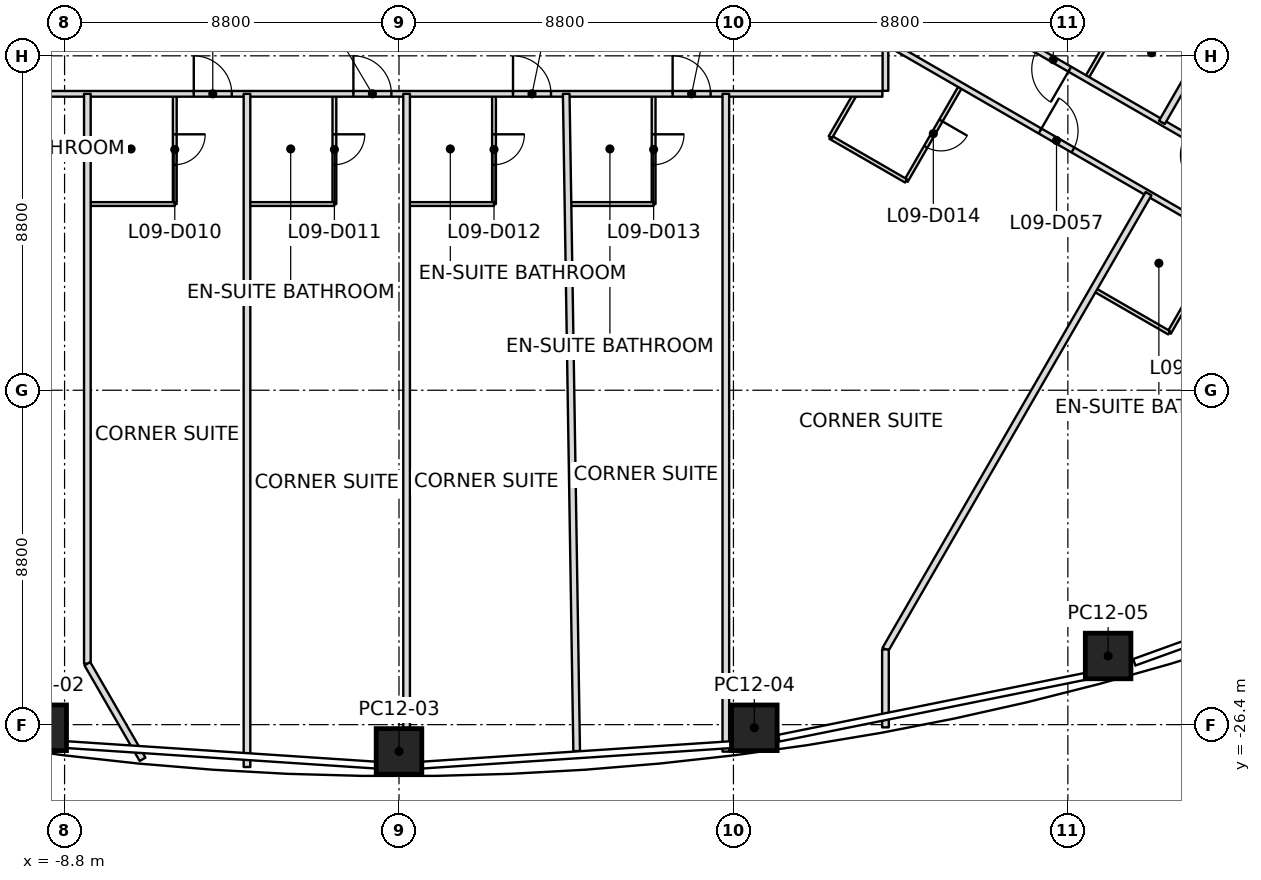
"""IFC4 building model, lengths in metres.
Left out: names, types, materials, properties, quantities, classifications, styles, units other than length and angle.
Written with IfcOpenShell. Run it as: python <this file> out.ifc"""

import sys

from ifc_helpers import new_model, si_unit, direction, frame, frame_2d, origin, origin_2d, place, context, subcontext, project, spatial, rectangle, extrude, clip, halfspace, element, fill, save


model = new_model("IFC4")
c1 = context("Model", 3, precision=1e-05, world=origin(), true_north=direction((0.0, 1.0)))
c2 = subcontext(c1, "Body", "Model", "MODEL_VIEW")
j1 = project(units=[si_unit("LENGTHUNIT", "METRE"), si_unit("PLANEANGLEUNIT", "RADIAN")], contexts=[c1])
p1 = place(None, origin())
s1 = spatial("IfcSite", under=j1, at=p1, CompositionType="ELEMENT")
p2 = place(p1, origin())
s2 = spatial("IfcBuilding", under=s1, at=p2, CompositionType="ELEMENT")
p3 = place(p2, frame((0.0, 0.0, 55.4)))
s3 = spatial("IfcBuildingStorey", under=s2, at=p3, CompositionType="ELEMENT", Elevation=55.4)
p4 = place(p3, frame((-9.35, -26.482, 0.0), z_axis=(0.00938855127, 0.223717601847, 0.974608788042), x_axis=(0.984896435556, -0.170583568587, 0.029669131402)))
e1 = element("IfcColumn", 1, at=p4, inside=s3, PredefinedType="COLUMN", context=c2, shape_type="SweptSolid", body=[
    extrude(rectangle(XDim=1.2, YDim=1.2, at=origin_2d()), origin(), (0.0, 0.0, 1.0), 3.797),
])
p5 = place(p3, frame((0.0, -27.104, 0.0), z_axis=(0.0, 0.238674212769, 0.971099696303), x_axis=(-1.0, 0.0, 0.0)))
e2 = element("IfcColumn", 2, at=p5, inside=s3, PredefinedType="COLUMN", context=c2, shape_type="SweptSolid", body=[
    extrude(rectangle(XDim=1.2, YDim=1.2, at=origin_2d()), origin(), (0.0, 0.0, 1.0), 3.81),
])
p6 = place(p3, frame((9.35, -26.482, 0.0), z_axis=(-0.00938855127, 0.223717601847, 0.974608788042), x_axis=(-0.984896435556, -0.170583568587, 0.029669131402)))
e3 = element("IfcColumn", 3, at=p6, inside=s3, PredefinedType="COLUMN", context=c2, shape_type="SweptSolid", body=[
    extrude(rectangle(XDim=1.2, YDim=1.2, at=origin_2d()), origin(), (0.0, 0.0, 1.0), 3.797),
])
p7 = place(p3, frame((18.659, -24.593, 0.0), z_axis=(-0.018962740175, 0.175794991964, 0.984244144146), x_axis=(0.964231408406, 0.26352619053, -0.028491015209)))
e4 = element("IfcColumn", 4, at=p7, inside=s3, PredefinedType="COLUMN", context=c2, shape_type="SweptSolid", body=[
    clip(clip(extrude(rectangle(XDim=1.2, YDim=1.2, at=origin_2d()), origin(), (0.0, 0.0, 1.0), 3.76), halfspace(frame((0.0, 0.0, 0.001)), True)), halfspace(frame((0.0, 0.0, 3.759)), False)),
])
p8 = place(p3, frame((-8.2, -9.8, 0.0), z_axis=(0.0, 0.0, 1.0), x_axis=(0.0, -1.0, 0.0)))
e5 = element("IfcWall", 5, at=p8, inside=s3, PredefinedType="PARTITIONING", context=c2, shape_type="SweptSolid", body=[
    extrude(rectangle(XDim=14.997, YDim=0.175, at=frame_2d((7.498, 0.0))), origin(), (0.0, 0.0, 1.0), 3.0),
])
p9 = place(p3, frame((-8.2, -24.797, 0.0), z_axis=(0.0, 0.0, 1.0), x_axis=(0.499998917442, -0.866026028799, 0.0)))
e6 = element("IfcWall", 6, at=p9, inside=s3, PredefinedType="PARTITIONING", context=c2, shape_type="SweptSolid", body=[
    extrude(rectangle(XDim=2.905, YDim=0.175, at=frame_2d((1.452, 0.0))), origin(), (0.0, 0.0, 1.0), 2.784),
])
p10 = place(p3, frame((-4.0, -9.8, 0.0), z_axis=(0.0, 0.0, 1.0), x_axis=(0.0, -1.0, 0.0)))
e7 = element("IfcWall", 7, at=p10, inside=s3, PredefinedType="PARTITIONING", context=c2, shape_type="SweptSolid", body=[
    extrude(rectangle(XDim=17.715, YDim=0.175, at=frame_2d((8.857, 0.0))), origin(), (0.0, 0.0, 1.0), 2.784),
])
p11 = place(p3, frame((0.2, -9.8, 0.0), z_axis=(0.0, 0.0, 1.0), x_axis=(0.0, -1.0, 0.0)))
e8 = element("IfcWall", 8, at=p11, inside=s3, PredefinedType="PARTITIONING", context=c2, shape_type="SweptSolid", body=[
    extrude(rectangle(XDim=17.828, YDim=0.175, at=frame_2d((8.914, 0.0))), origin(), (0.0, 0.0, 1.0), 3.0),
])
p12 = place(p3, frame((4.4, -9.8, 0.0), z_axis=(0.0, 0.0, 1.0), x_axis=(0.015892742746, -0.999873702388, 0.0)))
e9 = element("IfcWall", 9, at=p12, inside=s3, PredefinedType="PARTITIONING", context=c2, shape_type="SweptSolid", body=[
    extrude(rectangle(XDim=17.297, YDim=0.175, at=frame_2d((8.649, 0.0))), origin(), (0.0, 0.0, 1.0), 2.934),
])
p13 = place(p3, frame((8.6, -9.8, 0.0), z_axis=(0.0, 0.0, 1.0), x_axis=(0.0, -1.0, 0.0)))
e10 = element("IfcWall", 10, at=p13, inside=s3, PredefinedType="PARTITIONING", context=c2, shape_type="SweptSolid", body=[
    extrude(rectangle(XDim=17.31, YDim=0.175, at=frame_2d((8.655, 0.0))), origin(), (0.0, 0.0, 1.0), 2.934),
])
p14 = place(p3, frame((19.724, -12.427, 0.0), z_axis=(0.0, 0.0, 1.0), x_axis=(-0.499994112739, -0.866028802769, 0.0)))
e11 = element("IfcWall", 11, at=p14, inside=s3, PredefinedType="PARTITIONING", context=c2, shape_type="SweptSolid", body=[
    extrude(rectangle(XDim=13.847, YDim=0.175, at=frame_2d((6.924, 0.0))), origin(), (0.0, 0.0, 1.0), 2.797),
])
p15 = place(p3, frame((12.8, -24.419, 0.0), z_axis=(0.0, 0.0, 1.0), x_axis=(0.0, -1.0, 0.0)))
e12 = element("IfcWall", 12, at=p15, inside=s3, PredefinedType="PARTITIONING", context=c2, shape_type="SweptSolid", body=[
    extrude(rectangle(XDim=2.052, YDim=0.175, at=frame_2d((1.026, 0.0))), origin(), (0.0, 0.0, 1.0), 2.934),
])
p16 = place(p3, frame((20.075, -10.551, 0.0), z_axis=(0.0, 0.0, 1.0), x_axis=(0.500001190589, 0.866024716396, 0.0)))
e13 = element("IfcWall", 13, at=p16, inside=s3, PredefinedType="PARTITIONING", context=c2, shape_type="SweptSolid", body=[
    extrude(rectangle(XDim=12.156, YDim=0.175, at=frame_2d((6.078, 0.0))), origin(), (0.0, 0.0, 1.0), 2.934),
])
p17 = place(p3, frame((-12.72, -9.8, 0.0), z_axis=(0.0, 0.0, 1.0), x_axis=(1.0, 0.0, 0.0)))
e14 = element("IfcWall", 14, at=p17, inside=s3, PredefinedType="PARTITIONING", context=c2, shape_type="SweptSolid", body=[
    extrude(rectangle(XDim=25.44, YDim=0.15, at=frame_2d((12.72, 0.0))), origin(), (0.0, 0.0, 1.0), 2.797),
])
p18 = place(p17, frame((7.32, 0.0, 0.0)))
e15 = element("IfcOpeningElement", 15, at=p18, cuts=e14, PredefinedType="OPENING", context=c2, shape_type="SweptSolid", body=[
    extrude(rectangle(XDim=1.0, YDim=2.1, at=frame_2d((0.5, 1.05))), frame((0.0, 0.075, 0.0), z_axis=(0.0, -1.0, 0.0), x_axis=(1.0, 0.0, 0.0)), (0.0, 0.0, 1.0), 0.15),
])
p19 = place(p17, frame((11.52, 0.0, 0.0)))
e16 = element("IfcOpeningElement", 16, at=p19, cuts=e14, PredefinedType="OPENING", context=c2, shape_type="SweptSolid", body=[
    extrude(rectangle(XDim=1.0, YDim=2.1, at=frame_2d((0.5, 1.05))), frame((0.0, 0.075, 0.0), z_axis=(0.0, -1.0, 0.0), x_axis=(1.0, 0.0, 0.0)), (0.0, 0.0, 1.0), 0.15),
])
p20 = place(p17, frame((15.72, 0.0, 0.0)))
e17 = element("IfcOpeningElement", 17, at=p20, cuts=e14, PredefinedType="OPENING", context=c2, shape_type="SweptSolid", body=[
    extrude(rectangle(XDim=1.0, YDim=2.1, at=frame_2d((0.5, 1.05))), frame((0.0, 0.075, 0.0), z_axis=(0.0, -1.0, 0.0), x_axis=(1.0, 0.0, 0.0)), (0.0, 0.0, 1.0), 0.15),
])
p21 = place(p17, frame((19.92, 0.0, 0.0)))
e18 = element("IfcOpeningElement", 18, at=p21, cuts=e14, PredefinedType="OPENING", context=c2, shape_type="SweptSolid", body=[
    extrude(rectangle(XDim=1.0, YDim=2.1, at=frame_2d((0.5, 1.05))), frame((0.0, 0.075, 0.0), z_axis=(0.0, -1.0, 0.0), x_axis=(1.0, 0.0, 0.0)), (0.0, 0.0, 1.0), 0.15),
])
p22 = place(p3, frame((12.8, -9.72, 0.0), z_axis=(0.0, 0.0, 1.0), x_axis=(0.0, 1.0, 0.0)))
e19 = element("IfcWall", 19, at=p22, inside=s3, PredefinedType="PARTITIONING", context=c2, shape_type="SweptSolid", body=[
    extrude(rectangle(XDim=1.291, YDim=0.15, at=frame_2d((0.646, 0.0))), origin(), (0.0, 0.0, 1.0), 2.797),
])
p23 = place(p3, frame((12.879, -8.475, 0.0), z_axis=(0.0, 0.0, 1.0), x_axis=(0.866028715104, -0.499994264582, 0.0)))
e20 = element("IfcWall", 20, at=p23, inside=s3, PredefinedType="PARTITIONING", context=c2, shape_type="SweptSolid", body=[
    extrude(rectangle(XDim=12.103, YDim=0.15, at=frame_2d((6.052, 0.0))), origin(), (0.0, 0.0, 1.0), 2.797),
])
p24 = place(p23, frame((4.606, 0.0, 0.0)))
e21 = element("IfcOpeningElement", 21, at=p24, cuts=e20, PredefinedType="OPENING", context=c2, shape_type="SweptSolid", body=[
    extrude(rectangle(XDim=1.0, YDim=2.1, at=frame_2d((0.5, 1.05))), frame((0.0, 0.075, 0.0), z_axis=(0.0, -1.0, 0.0), x_axis=(1.0, 0.0, 0.0)), (0.0, 0.0, 1.0), 0.15),
])
p25 = place(p23, frame((10.703, 0.0, 0.0)))
e22 = element("IfcOpeningElement", 22, at=p25, cuts=e20, PredefinedType="OPENING", context=c2, shape_type="SweptSolid", body=[
    extrude(rectangle(XDim=1.0, YDim=2.1, at=frame_2d((0.5, 1.05))), frame((0.0, 0.075, 0.0), z_axis=(0.0, -1.0, 0.0), x_axis=(1.0, 0.0, 0.0)), (0.0, 0.0, 1.0), 0.15),
])
p26 = place(p3, frame((24.192, -12.928, 0.0), z_axis=(0.0, 0.0, 1.0), x_axis=(-0.866018681408, 0.500011643316, 0.0)))
e23 = element("IfcWall", 23, at=p26, inside=s3, PredefinedType="PARTITIONING", context=c2, shape_type="SweptSolid", body=[
    extrude(rectangle(XDim=13.154, YDim=0.15, at=frame_2d((6.577, 0.0))), origin(), (0.0, 0.0, 1.0), 2.947),
])
p27 = place(p26, frame((3.037, 0.0, 0.0)))
e24 = element("IfcOpeningElement", 24, at=p27, cuts=e23, PredefinedType="OPENING", context=c2, shape_type="SweptSolid", body=[
    extrude(rectangle(XDim=1.0, YDim=2.1, at=frame_2d((0.5, 1.05))), frame((0.0, 0.075, 0.0), z_axis=(0.0, -1.0, 0.0), x_axis=(1.0, 0.0, 0.0)), (0.0, 0.0, 1.0), 0.15),
])
p28 = place(p26, frame((7.554, 0.0, 0.0)))
e25 = element("IfcOpeningElement", 25, at=p28, cuts=e23, PredefinedType="OPENING", context=c2, shape_type="SweptSolid", body=[
    extrude(rectangle(XDim=1.0, YDim=2.1, at=frame_2d((0.5, 1.05))), frame((0.0, 0.075, 0.0), z_axis=(0.0, -1.0, 0.0), x_axis=(1.0, 0.0, 0.0)), (0.0, 0.0, 1.0), 0.15),
])
p29 = place(p3, frame((-5.9, -9.83, 0.0), z_axis=(0.0, 0.0, 1.0), x_axis=(0.0, -1.0, 0.0)))
e26 = element("IfcWall", 26, at=p29, inside=s3, PredefinedType="PARTITIONING", context=c2, shape_type="SweptSolid", body=[
    extrude(rectangle(XDim=2.87, YDim=0.1, at=frame_2d((1.435, 0.0))), origin(), (0.0, 0.0, 1.0), 3.0),
])
p30 = place(p29, frame((1.035, 0.0, 0.0)))
e27 = element("IfcOpeningElement", 27, at=p30, cuts=e26, PredefinedType="OPENING", context=c2, shape_type="SweptSolid", body=[
    extrude(rectangle(XDim=0.8, YDim=2.1, at=frame_2d((0.4, 1.05))), frame((0.0, 0.05, 0.0), z_axis=(0.0, -1.0, 0.0), x_axis=(1.0, 0.0, 0.0)), (0.0, 0.0, 1.0), 0.1),
])
p31 = place(p3, frame((-5.9, -12.7, 0.0), z_axis=(0.0, 0.0, 1.0), x_axis=(-1.0, 0.0, 0.0)))
e28 = element("IfcWall", 28, at=p31, inside=s3, PredefinedType="PARTITIONING", context=c2, shape_type="SweptSolid", body=[
    extrude(rectangle(XDim=2.27, YDim=0.1, at=frame_2d((1.135, 0.0))), origin(), (0.0, 0.0, 1.0), 2.797),
])
p32 = place(p3, frame((-1.7, -9.83, 0.0), z_axis=(0.0, 0.0, 1.0), x_axis=(0.0, -1.0, 0.0)))
e29 = element("IfcWall", 29, at=p32, inside=s3, PredefinedType="PARTITIONING", context=c2, shape_type="SweptSolid", body=[
    extrude(rectangle(XDim=2.87, YDim=0.1, at=frame_2d((1.435, 0.0))), origin(), (0.0, 0.0, 1.0), 3.0),
])
p33 = place(p32, frame((1.035, 0.0, 0.0)))
e30 = element("IfcOpeningElement", 30, at=p33, cuts=e29, PredefinedType="OPENING", context=c2, shape_type="SweptSolid", body=[
    extrude(rectangle(XDim=0.8, YDim=2.1, at=frame_2d((0.4, 1.05))), frame((0.0, 0.05, 0.0), z_axis=(0.0, -1.0, 0.0), x_axis=(1.0, 0.0, 0.0)), (0.0, 0.0, 1.0), 0.1),
])
p34 = place(p3, frame((-1.7, -12.7, 0.0), z_axis=(0.0, 0.0, 1.0), x_axis=(-1.0, 0.0, 0.0)))
e31 = element("IfcWall", 31, at=p34, inside=s3, PredefinedType="PARTITIONING", context=c2, shape_type="SweptSolid", body=[
    extrude(rectangle(XDim=2.27, YDim=0.1, at=frame_2d((1.135, 0.0))), origin(), (0.0, 0.0, 1.0), 2.947),
])
p35 = place(p3, frame((2.5, -9.83, 0.0), z_axis=(0.0, 0.0, 1.0), x_axis=(0.0, -1.0, 0.0)))
e32 = element("IfcWall", 32, at=p35, inside=s3, PredefinedType="PARTITIONING", context=c2, shape_type="SweptSolid", body=[
    extrude(rectangle(XDim=2.87, YDim=0.1, at=frame_2d((1.435, 0.0))), origin(), (0.0, 0.0, 1.0), 3.0),
])
p36 = place(p35, frame((1.035, 0.0, 0.0)))
e33 = element("IfcOpeningElement", 33, at=p36, cuts=e32, PredefinedType="OPENING", context=c2, shape_type="SweptSolid", body=[
    extrude(rectangle(XDim=0.8, YDim=2.1, at=frame_2d((0.4, 1.05))), frame((0.0, 0.05, 0.0), z_axis=(0.0, -1.0, 0.0), x_axis=(1.0, 0.0, 0.0)), (0.0, 0.0, 1.0), 0.1),
])
p37 = place(p3, frame((2.5, -12.7, 0.0), z_axis=(0.0, 0.0, 1.0), x_axis=(-1.0, 0.0, 0.0)))
e34 = element("IfcWall", 34, at=p37, inside=s3, PredefinedType="PARTITIONING", context=c2, shape_type="SweptSolid", body=[
    extrude(rectangle(XDim=2.27, YDim=0.1, at=frame_2d((1.135, 0.0))), origin(), (0.0, 0.0, 1.0), 3.0),
])
p38 = place(p3, frame((6.7, -9.83, 0.0), z_axis=(0.0, 0.0, 1.0), x_axis=(0.0, -1.0, 0.0)))
e35 = element("IfcWall", 35, at=p38, inside=s3, PredefinedType="PARTITIONING", context=c2, shape_type="SweptSolid", body=[
    extrude(rectangle(XDim=2.87, YDim=0.1, at=frame_2d((1.435, 0.0))), origin(), (0.0, 0.0, 1.0), 3.0),
])
p39 = place(p38, frame((1.035, 0.0, 0.0)))
e36 = element("IfcOpeningElement", 36, at=p39, cuts=e35, PredefinedType="OPENING", context=c2, shape_type="SweptSolid", body=[
    extrude(rectangle(XDim=0.8, YDim=2.1, at=frame_2d((0.4, 1.05))), frame((0.0, 0.05, 0.0), z_axis=(0.0, -1.0, 0.0), x_axis=(1.0, 0.0, 0.0)), (0.0, 0.0, 1.0), 0.1),
])
p40 = place(p3, frame((6.7, -12.7, 0.0), z_axis=(0.0, 0.0, 1.0), x_axis=(-1.0, 0.0, 0.0)))
e37 = element("IfcWall", 37, at=p40, inside=s3, PredefinedType="PARTITIONING", context=c2, shape_type="SweptSolid", body=[
    extrude(rectangle(XDim=2.27, YDim=0.1, at=frame_2d((1.135, 0.0))), origin(), (0.0, 0.0, 1.0), 2.947),
])
p41 = place(p3, frame((14.777, -9.605, 0.0), z_axis=(0.0, 0.0, 1.0), x_axis=(-0.499999802827, -0.866025517622, 0.0)))
e38 = element("IfcWall", 38, at=p41, inside=s3, PredefinedType="PARTITIONING", context=c2, shape_type="SweptSolid", body=[
    extrude(rectangle(XDim=2.87, YDim=0.1, at=frame_2d((1.435, 0.0))), origin(), (0.0, 0.0, 1.0), 2.797),
])
p42 = place(p41, frame((1.035, 0.0, 0.0)))
e39 = element("IfcOpeningElement", 39, at=p42, cuts=e38, PredefinedType="OPENING", context=c2, shape_type="SweptSolid", body=[
    extrude(rectangle(XDim=0.8, YDim=2.1, at=frame_2d((0.4, 1.05))), frame((0.0, 0.05, 0.0), z_axis=(0.0, -1.0, 0.0), x_axis=(1.0, 0.0, 0.0)), (0.0, 0.0, 1.0), 0.1),
])
p43 = place(p3, frame((13.342, -12.091, 0.0), z_axis=(0.0, 0.0, 1.0), x_axis=(-0.86602648383, 0.499998129301, 0.0)))
e40 = element("IfcWall", 40, at=p43, inside=s3, PredefinedType="PARTITIONING", context=c2, shape_type="SweptSolid", body=[
    extrude(rectangle(XDim=2.3, YDim=0.1, at=frame_2d((1.15, 0.0))), origin(), (0.0, 0.0, 1.0), 2.947),
])
p44 = place(p3, frame((11.35, -10.941, 0.0), z_axis=(0.0, 0.0, 1.0), x_axis=(0.499865263774, 0.866103179807, 0.0)))
e41 = element("IfcWall", 41, at=p44, inside=s3, PredefinedType="PARTITIONING", context=c2, shape_type="SweptSolid", body=[
    extrude(rectangle(XDim=1.282, YDim=0.1, at=frame_2d((0.641, 0.0))), origin(), (0.0, 0.0, 1.0), 3.0),
])
p45 = place(p3, frame((18.098, -9.375, 0.0), z_axis=(0.0, 0.0, 1.0), x_axis=(0.499936001555, 0.866062350151, 0.0)))
e42 = element("IfcWall", 42, at=p45, inside=s3, PredefinedType="PARTITIONING", context=c2, shape_type="SweptSolid", body=[
    extrude(rectangle(XDim=2.87, YDim=0.1, at=frame_2d((1.435, 0.0))), origin(), (0.0, 0.0, 1.0), 2.947),
])
p46 = place(p45, frame((1.035, 0.0, 0.0)))
e43 = element("IfcOpeningElement", 43, at=p46, cuts=e42, PredefinedType="OPENING", context=c2, shape_type="SweptSolid", body=[
    extrude(rectangle(XDim=0.8, YDim=2.1, at=frame_2d((0.4, 1.05))), frame((0.0, 0.05, 0.0), z_axis=(0.0, -1.0, 0.0), x_axis=(1.0, 0.0, 0.0)), (0.0, 0.0, 1.0), 0.1),
])
p47 = place(p3, frame((21.701, -13.603, 0.0), z_axis=(0.0, 0.0, 1.0), x_axis=(-0.500036638401, -0.866004249561, 0.0)))
e44 = element("IfcWall", 44, at=p47, inside=s3, PredefinedType="PARTITIONING", context=c2, shape_type="SweptSolid", body=[
    extrude(rectangle(XDim=2.87, YDim=0.1, at=frame_2d((1.435, 0.0))), origin(), (0.0, 0.0, 1.0), 3.0),
])
p48 = place(p47, frame((1.035, 0.0, 0.0)))
e45 = element("IfcOpeningElement", 45, at=p48, cuts=e44, PredefinedType="OPENING", context=c2, shape_type="SweptSolid", body=[
    extrude(rectangle(XDim=0.8, YDim=2.1, at=frame_2d((0.4, 1.05))), frame((0.0, 0.05, 0.0), z_axis=(0.0, -1.0, 0.0), x_axis=(1.0, 0.0, 0.0)), (0.0, 0.0, 1.0), 0.1),
])
p49 = place(p3, frame((20.266, -16.088, 0.0), z_axis=(0.0, 0.0, 1.0), x_axis=(-0.866017224141, 0.500014167291, 0.0)))
e46 = element("IfcWall", 46, at=p49, inside=s3, PredefinedType="PARTITIONING", context=c2, shape_type="SweptSolid", body=[
    extrude(rectangle(XDim=2.27, YDim=0.1, at=frame_2d((1.135, 0.0))), origin(), (0.0, 0.0, 1.0), 3.0),
])
p50 = place(p18, origin())
e47 = element("IfcDoor", 47, at=p50, inside=s3, OperationType="SINGLE_SWING_LEFT", PredefinedType="DOOR", context=c2, shape_type="SweptSolid", body=[
    extrude(rectangle(XDim=1.0, YDim=2.1, at=frame_2d((0.5, 1.05))), frame((0.0, 0.025, 0.0), z_axis=(0.0, -1.0, 0.0), x_axis=(1.0, 0.0, 0.0)), (0.0, 0.0, 1.0), 0.05),
])
fill(e15, e47)
p51 = place(p30, origin())
e48 = element("IfcDoor", 48, at=p51, inside=s3, OperationType="SINGLE_SWING_RIGHT", PredefinedType="DOOR", context=c2, shape_type="SweptSolid", body=[
    extrude(rectangle(XDim=0.8, YDim=2.1, at=frame_2d((0.4, 1.05))), frame((0.0, 0.025, 0.0), z_axis=(0.0, -1.0, 0.0), x_axis=(1.0, 0.0, 0.0)), (0.0, 0.0, 1.0), 0.05),
])
fill(e27, e48)
p52 = place(p19, origin())
e49 = element("IfcDoor", 49, at=p52, inside=s3, OperationType="SINGLE_SWING_LEFT", PredefinedType="DOOR", context=c2, shape_type="SweptSolid", body=[
    extrude(rectangle(XDim=1.0, YDim=2.1, at=frame_2d((0.5, 1.05))), frame((0.0, 0.025, 0.0), z_axis=(0.0, -1.0, 0.0), x_axis=(1.0, 0.0, 0.0)), (0.0, 0.0, 1.0), 0.05),
])
fill(e16, e49)
p53 = place(p33, origin())
e50 = element("IfcDoor", 50, at=p53, inside=s3, OperationType="SINGLE_SWING_RIGHT", PredefinedType="DOOR", context=c2, shape_type="SweptSolid", body=[
    extrude(rectangle(XDim=0.8, YDim=2.1, at=frame_2d((0.4, 1.05))), frame((0.0, 0.025, 0.0), z_axis=(0.0, -1.0, 0.0), x_axis=(1.0, 0.0, 0.0)), (0.0, 0.0, 1.0), 0.05),
])
fill(e30, e50)
p54 = place(p20, origin())
e51 = element("IfcDoor", 51, at=p54, inside=s3, OperationType="SINGLE_SWING_LEFT", PredefinedType="DOOR", context=c2, shape_type="SweptSolid", body=[
    extrude(rectangle(XDim=1.0, YDim=2.1, at=frame_2d((0.5, 1.05))), frame((0.0, 0.025, 0.0), z_axis=(0.0, -1.0, 0.0), x_axis=(1.0, 0.0, 0.0)), (0.0, 0.0, 1.0), 0.05),
])
fill(e17, e51)
p55 = place(p36, origin())
e52 = element("IfcDoor", 52, at=p55, inside=s3, OperationType="SINGLE_SWING_LEFT", PredefinedType="DOOR", context=c2, shape_type="SweptSolid", body=[
    extrude(rectangle(XDim=0.8, YDim=2.1, at=frame_2d((0.4, 1.05))), frame((0.0, 0.025, 0.0), z_axis=(0.0, -1.0, 0.0), x_axis=(1.0, 0.0, 0.0)), (0.0, 0.0, 1.0), 0.05),
])
fill(e33, e52)
p56 = place(p21, origin())
e53 = element("IfcDoor", 53, at=p56, inside=s3, OperationType="SINGLE_SWING_LEFT", PredefinedType="DOOR", context=c2, shape_type="SweptSolid", body=[
    extrude(rectangle(XDim=1.0, YDim=2.1, at=frame_2d((0.5, 1.05))), frame((0.0, 0.025, 0.0), z_axis=(0.0, -1.0, 0.0), x_axis=(1.0, 0.0, 0.0)), (0.0, 0.0, 1.0), 0.05),
])
fill(e18, e53)
p57 = place(p39, origin())
e54 = element("IfcDoor", 54, at=p57, inside=s3, OperationType="SINGLE_SWING_RIGHT", PredefinedType="DOOR", context=c2, shape_type="SweptSolid", body=[
    extrude(rectangle(XDim=0.8, YDim=2.1, at=frame_2d((0.4, 1.05))), frame((0.0, 0.025, 0.0), z_axis=(0.0, -1.0, 0.0), x_axis=(1.0, 0.0, 0.0)), (0.0, 0.0, 1.0), 0.05),
])
fill(e36, e54)
p58 = place(p24, origin())
e55 = element("IfcDoor", 55, at=p58, inside=s3, OperationType="SINGLE_SWING_RIGHT", PredefinedType="DOOR", context=c2, shape_type="SweptSolid", body=[
    extrude(rectangle(XDim=1.0, YDim=2.1, at=frame_2d((0.5, 1.05))), frame((0.0, 0.025, 0.0), z_axis=(0.0, -1.0, 0.0), x_axis=(1.0, 0.0, 0.0)), (0.0, 0.0, 1.0), 0.05),
])
fill(e21, e55)
p59 = place(p42, origin())
e56 = element("IfcDoor", 56, at=p59, inside=s3, OperationType="SINGLE_SWING_RIGHT", PredefinedType="DOOR", context=c2, shape_type="SweptSolid", body=[
    extrude(rectangle(XDim=0.8, YDim=2.1, at=frame_2d((0.4, 1.05))), frame((0.0, 0.025, 0.0), z_axis=(0.0, -1.0, 0.0), x_axis=(1.0, 0.0, 0.0)), (0.0, 0.0, 1.0), 0.05),
])
fill(e39, e56)
p60 = place(p28, origin())
e57 = element("IfcDoor", 57, at=p60, inside=s3, OperationType="SINGLE_SWING_LEFT", PredefinedType="DOOR", context=c2, shape_type="SweptSolid", body=[
    extrude(rectangle(XDim=1.0, YDim=2.1, at=frame_2d((0.5, 1.05))), frame((0.0, 0.025, 0.0), z_axis=(0.0, -1.0, 0.0), x_axis=(1.0, 0.0, 0.0)), (0.0, 0.0, 1.0), 0.05),
])
fill(e25, e57)
save(model, sys.argv[1])
